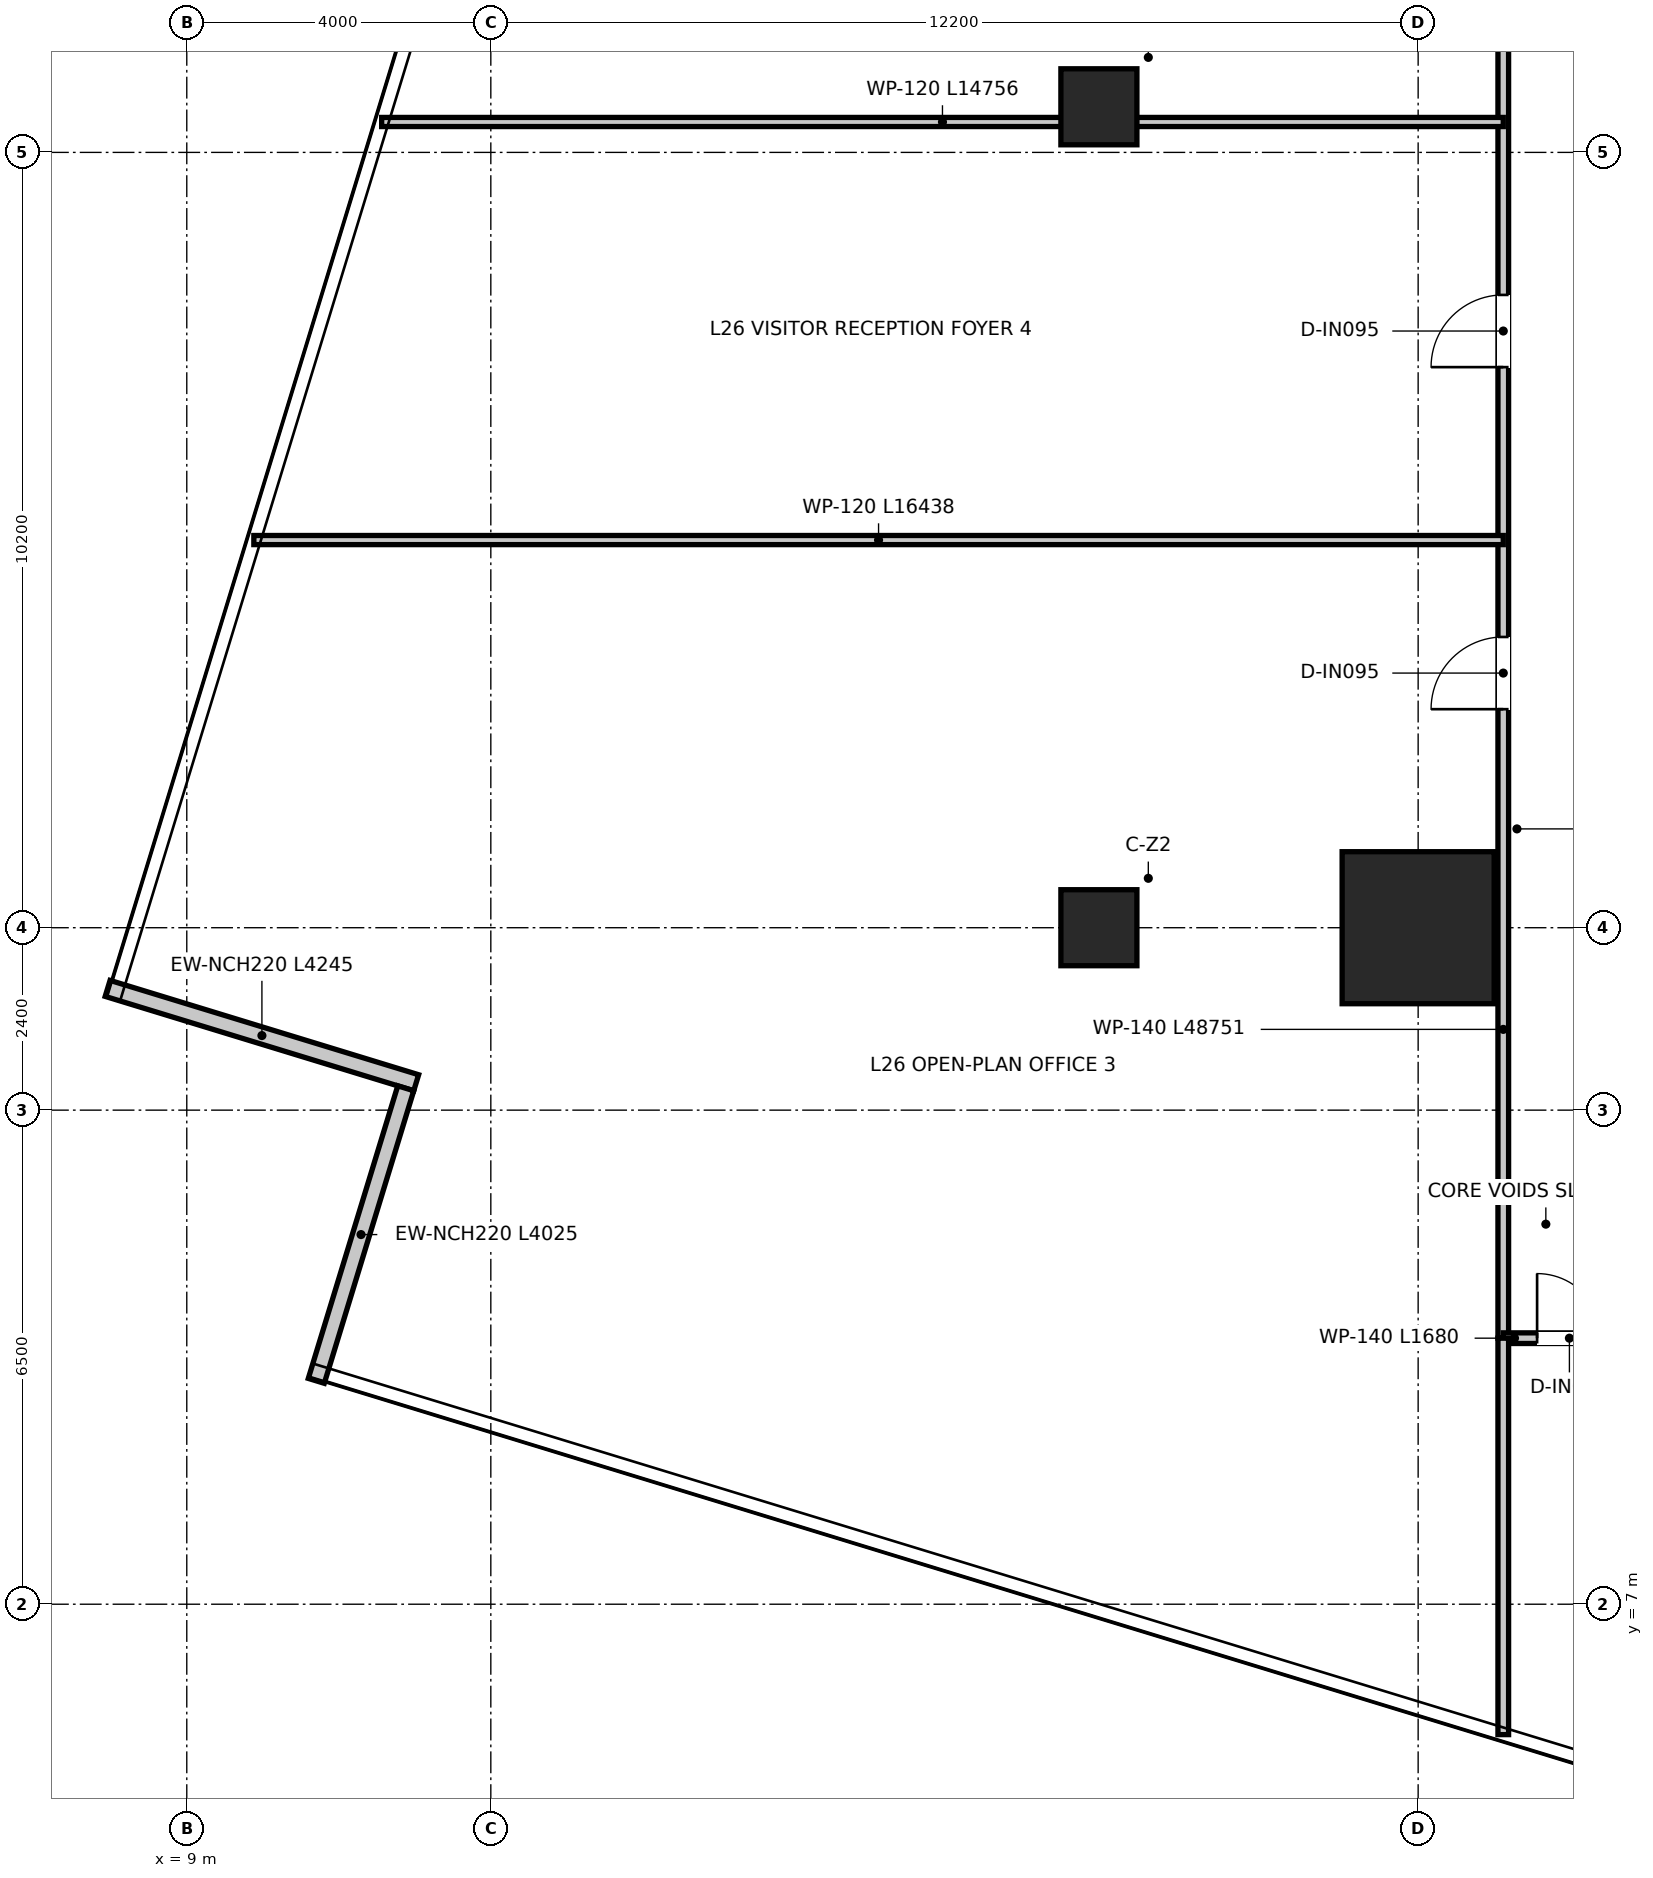
"""IFC4 building model, lengths in metres.
Left out: names, types, materials, properties, quantities, classifications, styles, units other than length and angle.
Written with IfcOpenShell. Run it as: python <this file> out.ifc"""

import sys

from ifc_helpers import new_model, si_unit, direction, frame, frame_2d, origin, origin_2d, place, context, subcontext, project, spatial, rectangle, extrude, source, transform, mapped, element, fill, save


model = new_model("IFC4")
c1 = context("Model", 3, precision=1e-05, world=origin(), true_north=direction((0.0, 1.0)))
c2 = subcontext(c1, "Body", "Model", "MODEL_VIEW")
j1 = project(units=[si_unit("LENGTHUNIT", "METRE"), si_unit("PLANEANGLEUNIT", "RADIAN")], contexts=[c1])
p1 = place(None, origin())
s1 = spatial("IfcSite", under=j1, at=p1, CompositionType="ELEMENT")
p2 = place(p1, origin())
s2 = spatial("IfcBuilding", under=s1, at=p2, CompositionType="ELEMENT")
p3 = place(p2, frame((0.0, 0.0, 109.8)))
s3 = spatial("IfcBuildingStorey", under=s2, at=p3, CompositionType="ELEMENT", Elevation=109.8)
m1 = source(origin(), c2, "Body", "SweptSolid", [
    extrude(rectangle(XDim=2.0, YDim=2.0, at=origin_2d()), origin(), (0.0, 0.0, 1.0), 3.95),
])
p4 = place(p3, frame((25.2, 15.9, 0.0), z_axis=(0.0, 0.0, 1.0), x_axis=(1.0, 0.0, 0.0)))
e1 = element("IfcColumn", 1, at=p4, inside=s3, PredefinedType="USERDEFINED", context=c2, shape_type="MappedRepresentation", body=[
    mapped(m1, transform((0.0, 0.0, 0.0), x_axis=(1.0, 0.0, 0.0), y_axis=(0.0, 1.0, 0.0), z_axis=(0.0, 0.0, 1.0), scale=1.0)),
])
m2 = source(origin(), c2, "Body", "SweptSolid", [
    extrude(rectangle(XDim=1.0, YDim=1.0, at=origin_2d()), origin(), (0.0, 0.0, 1.0), 3.95),
])
for number, where, z_axis, x_axis in (
    (2, (21.0, 15.9, 0.0), (0.0, 0.0, 1.0), (1.0, 0.0, 0.0)),
    (3, (21.0, 26.7, 0.0), (0.0, 0.0, 1.0), (1.0, 0.0, 0.0)),
):
    element("IfcColumn", number, at=place(p3, frame(where, z_axis=z_axis, x_axis=x_axis)), inside=s3, PredefinedType="COLUMN", context=c2, shape_type="MappedRepresentation", body=[
        mapped(m2, transform((0.0, 0.0, 0.0), x_axis=(1.0, 0.0, 0.0), y_axis=(0.0, 1.0, 0.0), z_axis=(0.0, 0.0, 1.0), scale=1.0)),
    ])
p5 = place(p3, frame((7.959, 15.102, 0.0), z_axis=(0.0, 0.0, 1.0), x_axis=(0.95629976735, -0.292388021242, 0.0)))
e4 = element("IfcWall", 4, at=p5, inside=s3, PredefinedType="ELEMENTEDWALL", context=c2, shape_type="SweptSolid", body=[
    extrude(rectangle(XDim=4.245, YDim=0.22, at=frame_2d((2.123, 0.0))), origin(), (0.0, 0.0, 1.0), 3.67),
])
p6 = place(p3, frame((11.881, 13.788, 0.0), z_axis=(0.0, 0.0, 1.0), x_axis=(-0.292363388235, -0.956307298529, 0.0)))
e5 = element("IfcWall", 5, at=p6, inside=s3, PredefinedType="ELEMENTEDWALL", context=c2, shape_type="SweptSolid", body=[
    extrude(rectangle(XDim=4.025, YDim=0.22, at=frame_2d((2.012, 0.0))), origin(), (0.0, 0.0, 1.0), 3.67),
])
p7 = place(p3, frame((26.32, 10.5, 0.0), z_axis=(0.0, 0.0, 1.0), x_axis=(0.0, 1.0, 0.0)))
e6 = element("IfcWall", 6, at=p7, inside=s3, PredefinedType="PARTITIONING", context=c2, shape_type="SweptSolid", body=[
    extrude(rectangle(XDim=25.62, YDim=0.14, at=frame_2d((12.81, 0.0))), origin(), (0.0, 0.0, 1.0), 2.97),
])
p8 = place(p7, frame((8.275, 0.0, 0.0)))
e7 = element("IfcOpeningElement", 7, at=p8, cuts=e6, PredefinedType="OPENING", context=c2, shape_type="SweptSolid", body=[
    extrude(rectangle(XDim=0.95, YDim=2.1, at=frame_2d((0.475, 1.05))), frame((0.0, 0.08, 0.0), z_axis=(0.0, -1.0, 0.0), x_axis=(1.0, 0.0, 0.0)), (0.0, 0.0, 1.0), 0.16),
])
p9 = place(p7, frame((12.775, 0.0, 0.0)))
e8 = element("IfcOpeningElement", 8, at=p9, cuts=e6, PredefinedType="OPENING", context=c2, shape_type="SweptSolid", body=[
    extrude(rectangle(XDim=0.95, YDim=2.1, at=frame_2d((0.475, 1.05))), frame((0.0, 0.08, 0.0), z_axis=(0.0, -1.0, 0.0), x_axis=(1.0, 0.0, 0.0)), (0.0, 0.0, 1.0), 0.16),
])
p10 = place(p7, frame((18.275, 0.0, 0.0)))
e9 = element("IfcOpeningElement", 9, at=p10, cuts=e6, PredefinedType="OPENING", context=c2, shape_type="SweptSolid", body=[
    extrude(rectangle(XDim=0.95, YDim=2.1, at=frame_2d((0.475, 1.05))), frame((0.0, 0.08, 0.0), z_axis=(0.0, -1.0, 0.0), x_axis=(1.0, 0.0, 0.0)), (0.0, 0.0, 1.0), 0.16),
])
p11 = place(p7, frame((22.375, 0.0, 0.0)))
e10 = element("IfcOpeningElement", 10, at=p11, cuts=e6, PredefinedType="OPENING", context=c2, shape_type="SweptSolid", body=[
    extrude(rectangle(XDim=0.95, YDim=2.1, at=frame_2d((0.475, 1.05))), frame((0.0, 0.08, 0.0), z_axis=(0.0, -1.0, 0.0), x_axis=(1.0, 0.0, 0.0)), (0.0, 0.0, 1.0), 0.16),
])
p12 = place(p3, frame((26.32, 10.5, 0.0), z_axis=(0.0, 0.0, 1.0), x_axis=(1.0, 0.0, 0.0)))
e11 = element("IfcWall", 11, at=p12, inside=s3, PredefinedType="PARTITIONING", context=c2, shape_type="SweptSolid", body=[
    extrude(rectangle(XDim=1.68, YDim=0.14, at=frame_2d((0.84, 0.0))), origin(), (0.0, 0.0, 1.0), 3.67),
])
p13 = place(p12, frame((0.445, 0.0, 0.0)))
e12 = element("IfcOpeningElement", 12, at=p13, cuts=e11, PredefinedType="OPENING", context=c2, shape_type="SweptSolid", body=[
    extrude(rectangle(XDim=0.85, YDim=2.1, at=frame_2d((0.425, 1.05))), frame((0.0, 0.08, 0.0), z_axis=(0.0, -1.0, 0.0), x_axis=(1.0, 0.0, 0.0)), (0.0, 0.0, 1.0), 0.16),
])
p14 = place(p3, frame((26.32, 5.284, 0.0), z_axis=(0.0, 0.0, 1.0), x_axis=(0.0, 1.0, 0.0)))
e13 = element("IfcWall", 13, at=p14, inside=s3, PredefinedType="PARTITIONING", context=c2, shape_type="SweptSolid", body=[
    extrude(rectangle(XDim=5.216, YDim=0.14, at=frame_2d((2.608, 0.0))), origin(), (0.0, 0.0, 1.0), 3.67),
])
p15 = place(p3, frame((9.882, 21.0, 0.0), z_axis=(0.0, 0.0, 1.0), x_axis=(1.0, 0.0, 0.0)))
e14 = element("IfcWall", 14, at=p15, inside=s3, PredefinedType="PARTITIONING", context=c2, shape_type="SweptSolid", body=[
    extrude(rectangle(XDim=16.438, YDim=0.12, at=frame_2d((8.219, 0.0))), origin(), (0.0, 0.0, 1.0), 2.97),
])
p16 = place(p3, frame((11.564, 26.5, 0.0), z_axis=(0.0, 0.0, 1.0), x_axis=(1.0, 0.0, 0.0)))
e15 = element("IfcWall", 15, at=p16, inside=s3, PredefinedType="PARTITIONING", context=c2, shape_type="SweptSolid", body=[
    extrude(rectangle(XDim=14.756, YDim=0.12, at=frame_2d((7.378, 0.0))), origin(), (0.0, 0.0, 1.0), 2.97),
])
p17 = place(p8, origin())
e16 = element("IfcDoor", 16, at=p17, inside=s3, OperationType="SINGLE_SWING_LEFT", PredefinedType="DOOR", context=c2, shape_type="SweptSolid", body=[
    extrude(rectangle(XDim=0.95, YDim=2.1, at=frame_2d((0.475, 1.05))), frame((0.0, 0.025, 0.0), z_axis=(0.0, -1.0, 0.0), x_axis=(1.0, 0.0, 0.0)), (0.0, 0.0, 1.0), 0.05),
])
fill(e7, e16)
p18 = place(p9, origin())
e17 = element("IfcDoor", 17, at=p18, inside=s3, OperationType="SINGLE_SWING_LEFT", PredefinedType="DOOR", context=c2, shape_type="SweptSolid", body=[
    extrude(rectangle(XDim=0.95, YDim=2.1, at=frame_2d((0.475, 1.05))), frame((0.0, 0.025, 0.0), z_axis=(0.0, -1.0, 0.0), x_axis=(1.0, 0.0, 0.0)), (0.0, 0.0, 1.0), 0.05),
])
fill(e8, e17)
p19 = place(p13, origin())
e18 = element("IfcDoor", 18, at=p19, inside=s3, OperationType="SINGLE_SWING_LEFT", PredefinedType="DOOR", context=c2, shape_type="SweptSolid", body=[
    extrude(rectangle(XDim=0.85, YDim=2.1, at=frame_2d((0.425, 1.05))), frame((0.0, 0.025, 0.0), z_axis=(0.0, -1.0, 0.0), x_axis=(1.0, 0.0, 0.0)), (0.0, 0.0, 1.0), 0.05),
])
fill(e12, e18)
save(model, sys.argv[1])
